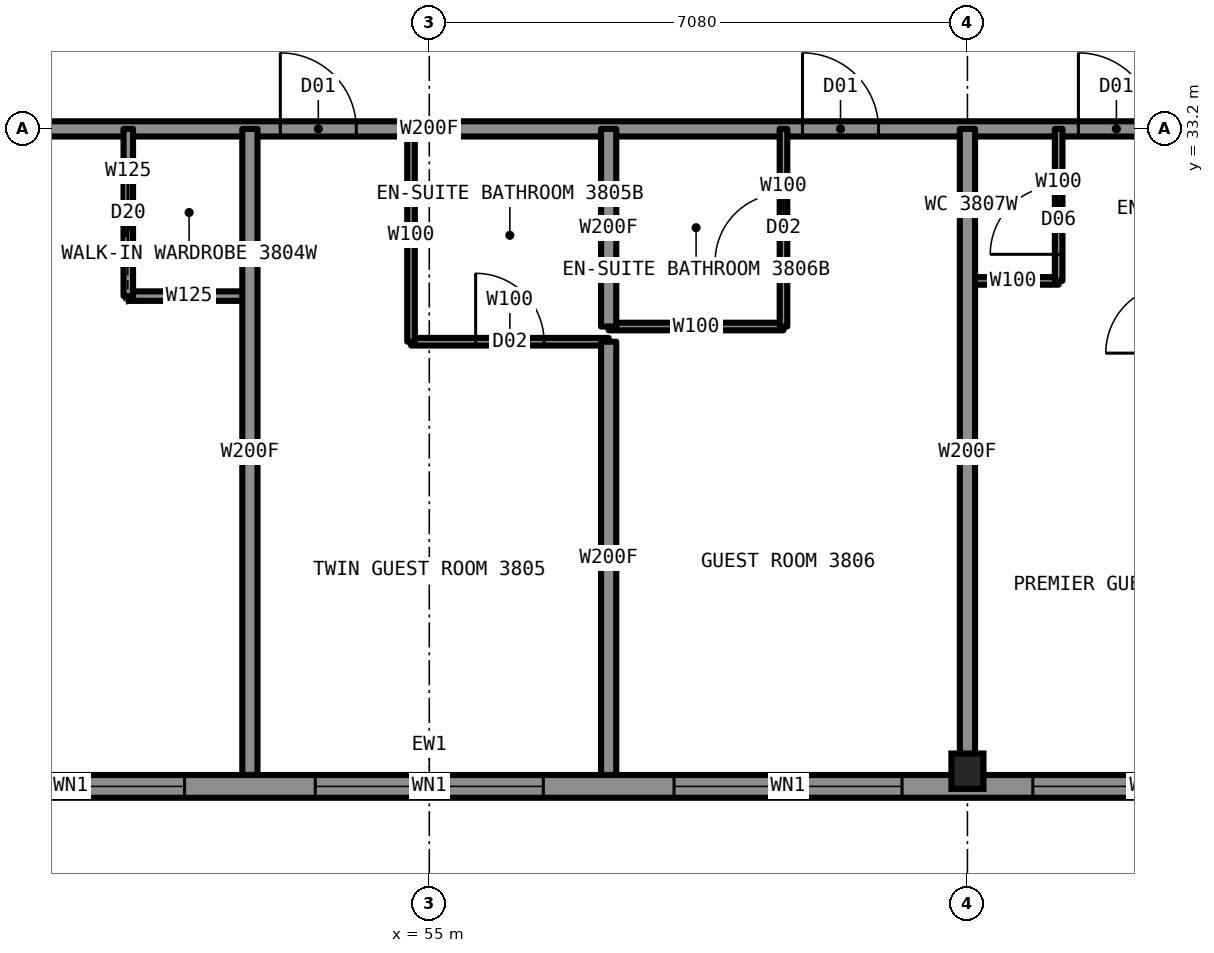
"""IFC4 building model, lengths in metres.
Left out: names, types, materials, properties, quantities, classifications, styles, units other than length and angle.
Written with IfcOpenShell. Run it as: python <this file> out.ifc"""

import sys

from ifc_helpers import new_model, si_unit, direction, frame, frame_2d, origin, origin_2d, place, context, subcontext, project, spatial, rectangle, i_section, extrude, element, fill, save


model = new_model("IFC4")
c1 = context("Model", 3, precision=1e-05, world=origin(), true_north=direction((0.0, 1.0)))
c2 = subcontext(c1, "Body", "Model", "MODEL_VIEW")
j1 = project(units=[si_unit("LENGTHUNIT", "METRE"), si_unit("PLANEANGLEUNIT", "RADIAN")], contexts=[c1])
p1 = place(None, origin())
s1 = spatial("IfcSite", under=j1, at=p1, CompositionType="ELEMENT")
p2 = place(p1, origin())
s2 = spatial("IfcBuilding", under=s1, at=p2, CompositionType="ELEMENT")
p3 = place(p2, frame((0.0, 0.0, 135.4)))
s3 = spatial("IfcBuildingStorey", under=s2, at=p3, CompositionType="ELEMENT", Elevation=135.4)
p4 = place(p3, frame((62.08, 24.75, 0.0), z_axis=(0.0, 0.0, 1.0), x_axis=(1.0, 0.0, 0.0)))
e1 = element("IfcColumn", 1, at=p4, inside=s3, PredefinedType="COLUMN", context=c2, shape_type="SweptSolid", body=[
    extrude(i_section(OverallWidth=0.422, OverallDepth=0.465, WebThickness=0.045, FlangeThickness=0.073, at=origin_2d()), origin(), (0.0, 0.0, 1.0), 3.5),
])
p5 = place(p3, frame((43.2, 33.2, 0.0), z_axis=(0.0, 0.0, 1.0), x_axis=(1.0, 0.0, 0.0)))
e2 = element("IfcWall", 2, at=p5, inside=s3, PredefinedType="PARTITIONING", context=c2, shape_type="SweptSolid", body=[
    extrude(rectangle(XDim=23.6, YDim=0.2, at=frame_2d((11.8, 0.0))), origin(), (0.0, 0.0, 1.0), 3.33),
])
p6 = place(p5, frame((3.0, 0.0, 0.0)))
e3 = element("IfcOpeningElement", 3, at=p6, cuts=e2, PredefinedType="OPENING", context=c2, shape_type="SweptSolid", body=[
    extrude(rectangle(XDim=1.0, YDim=2.2, at=frame_2d((0.5, 1.1))), frame((0.0, 0.11, 0.0), z_axis=(0.0, -1.0, 0.0), x_axis=(1.0, 0.0, 0.0)), (0.0, 0.0, 1.0), 0.22),
])
p7 = place(p5, frame((9.84, 0.0, 0.0)))
e4 = element("IfcOpeningElement", 4, at=p7, cuts=e2, PredefinedType="OPENING", context=c2, shape_type="SweptSolid", body=[
    extrude(rectangle(XDim=1.0, YDim=2.2, at=frame_2d((0.5, 1.1))), frame((0.0, 0.11, 0.0), z_axis=(0.0, -1.0, 0.0), x_axis=(1.0, 0.0, 0.0)), (0.0, 0.0, 1.0), 0.22),
])
p8 = place(p5, frame((16.71, 0.0, 0.0)))
e5 = element("IfcOpeningElement", 5, at=p8, cuts=e2, PredefinedType="OPENING", context=c2, shape_type="SweptSolid", body=[
    extrude(rectangle(XDim=1.0, YDim=2.2, at=frame_2d((0.5, 1.1))), frame((0.0, 0.11, 0.0), z_axis=(0.0, -1.0, 0.0), x_axis=(1.0, 0.0, 0.0)), (0.0, 0.0, 1.0), 0.22),
])
p9 = place(p5, frame((20.34, 0.0, 0.0)))
e6 = element("IfcOpeningElement", 6, at=p9, cuts=e2, PredefinedType="OPENING", context=c2, shape_type="SweptSolid", body=[
    extrude(rectangle(XDim=1.0, YDim=2.2, at=frame_2d((0.5, 1.1))), frame((0.0, 0.11, 0.0), z_axis=(0.0, -1.0, 0.0), x_axis=(1.0, 0.0, 0.0)), (0.0, 0.0, 1.0), 0.22),
])
p10 = place(p3, frame((62.08, 31.2, 0.0), z_axis=(0.0, 0.0, 1.0), x_axis=(1.0, 0.0, 0.0)))
e7 = element("IfcWall", 7, at=p10, inside=s3, PredefinedType="PARTITIONING", context=c2, shape_type="SweptSolid", body=[
    extrude(rectangle(XDim=1.2, YDim=0.1, at=frame_2d((0.6, 0.0))), origin(), (0.0, 0.0, 1.0), 3.33),
])
p11 = place(p3, frame((51.04, 31.0, 0.0), z_axis=(0.0, 0.0, 1.0), x_axis=(1.0, 0.0, 0.0)))
e8 = element("IfcWall", 8, at=p11, inside=s3, PredefinedType="PARTITIONING", context=c2, shape_type="SweptSolid", body=[
    extrude(rectangle(XDim=1.6, YDim=0.125, at=frame_2d((0.8, 0.0))), origin(), (0.0, 0.0, 1.0), 3.33),
])
p12 = place(p3, frame((57.36, 30.6, 0.0), z_axis=(0.0, 0.0, 1.0), x_axis=(1.0, 0.0, 0.0)))
e9 = element("IfcWall", 9, at=p12, inside=s3, PredefinedType="PARTITIONING", context=c2, shape_type="SweptSolid", body=[
    extrude(rectangle(XDim=2.3, YDim=0.1, at=frame_2d((1.15, 0.0))), origin(), (0.0, 0.0, 1.0), 3.33),
])
p13 = place(p3, frame((54.76, 30.4, 0.0), z_axis=(0.0, 0.0, 1.0), x_axis=(1.0, 0.0, 0.0)))
e10 = element("IfcWall", 10, at=p13, inside=s3, PredefinedType="PARTITIONING", context=c2, shape_type="SweptSolid", body=[
    extrude(rectangle(XDim=2.6, YDim=0.1, at=frame_2d((1.3, 0.0))), origin(), (0.0, 0.0, 1.0), 3.33),
])
p14 = place(p13, frame((0.85, 0.0, 0.0)))
e11 = element("IfcOpeningElement", 11, at=p14, cuts=e10, PredefinedType="OPENING", context=c2, shape_type="SweptSolid", body=[
    extrude(rectangle(XDim=0.9, YDim=2.1, at=frame_2d((0.45, 1.05))), frame((0.0, 0.06, 0.0), z_axis=(0.0, -1.0, 0.0), x_axis=(1.0, 0.0, 0.0)), (0.0, 0.0, 1.0), 0.12),
])
p15 = place(p3, frame((54.76, 30.4, 0.0), z_axis=(0.0, 0.0, 1.0), x_axis=(0.0, 1.0, 0.0)))
e12 = element("IfcWall", 12, at=p15, inside=s3, PredefinedType="PARTITIONING", context=c2, shape_type="SweptSolid", body=[
    extrude(rectangle(XDim=2.8, YDim=0.1, at=frame_2d((1.4, 0.0))), origin(), (0.0, 0.0, 1.0), 3.33),
])
p16 = place(p3, frame((52.64, 24.7, 0.0), z_axis=(0.0, 0.0, 1.0), x_axis=(0.0, 1.0, 0.0)))
e13 = element("IfcWall", 13, at=p16, inside=s3, PredefinedType="PARTITIONING", context=c2, shape_type="SweptSolid", body=[
    extrude(rectangle(XDim=8.5, YDim=0.2, at=frame_2d((4.25, 0.0))), origin(), (0.0, 0.0, 1.0), 3.33),
])
p17 = place(p3, frame((51.04, 31.0, 0.0), z_axis=(0.0, 0.0, 1.0), x_axis=(0.0, 1.0, 0.0)))
e14 = element("IfcWall", 14, at=p17, inside=s3, PredefinedType="PARTITIONING", context=c2, shape_type="SweptSolid", body=[
    extrude(rectangle(XDim=2.2, YDim=0.125, at=frame_2d((1.1, 0.0))), origin(), (0.0, 0.0, 1.0), 3.33),
])
p18 = place(p17, frame((0.7, 0.0, 0.0)))
e15 = element("IfcOpeningElement", 15, at=p18, cuts=e14, PredefinedType="OPENING", context=c2, shape_type="SweptSolid", body=[
    extrude(rectangle(XDim=0.8, YDim=2.1, at=frame_2d((0.4, 1.05))), frame((0.0, 0.073, 0.0), z_axis=(0.0, -1.0, 0.0), x_axis=(1.0, 0.0, 0.0)), (0.0, 0.0, 1.0), 0.145),
])
p19 = place(p3, frame((57.36, 24.7, 0.0), z_axis=(0.0, 0.0, 1.0), x_axis=(0.0, 1.0, 0.0)))
e16 = element("IfcWall", 16, at=p19, inside=s3, PredefinedType="PARTITIONING", context=c2, shape_type="SweptSolid", body=[
    extrude(rectangle(XDim=5.7, YDim=0.2, at=frame_2d((2.85, 0.0))), origin(), (0.0, 0.0, 1.0), 3.33),
])
p20 = place(p3, frame((57.36, 30.6, 0.0), z_axis=(0.0, 0.0, 1.0), x_axis=(0.0, 1.0, 0.0)))
e17 = element("IfcWall", 17, at=p20, inside=s3, PredefinedType="PARTITIONING", context=c2, shape_type="SweptSolid", body=[
    extrude(rectangle(XDim=2.6, YDim=0.2, at=frame_2d((1.3, 0.0))), origin(), (0.0, 0.0, 1.0), 3.33),
])
p21 = place(p3, frame((59.66, 30.6, 0.0), z_axis=(0.0, 0.0, 1.0), x_axis=(0.0, 1.0, 0.0)))
e18 = element("IfcWall", 18, at=p21, inside=s3, PredefinedType="PARTITIONING", context=c2, shape_type="SweptSolid", body=[
    extrude(rectangle(XDim=2.6, YDim=0.1, at=frame_2d((1.3, 0.0))), origin(), (0.0, 0.0, 1.0), 3.33),
])
p22 = place(p21, frame((0.85, 0.0, 0.0)))
e19 = element("IfcOpeningElement", 19, at=p22, cuts=e18, PredefinedType="OPENING", context=c2, shape_type="SweptSolid", body=[
    extrude(rectangle(XDim=0.9, YDim=2.1, at=frame_2d((0.45, 1.05))), frame((0.0, 0.06, 0.0), z_axis=(0.0, -1.0, 0.0), x_axis=(1.0, 0.0, 0.0)), (0.0, 0.0, 1.0), 0.12),
])
p23 = place(p3, frame((62.08, 24.7, 0.0), z_axis=(0.0, 0.0, 1.0), x_axis=(0.0, 1.0, 0.0)))
e20 = element("IfcWall", 20, at=p23, inside=s3, PredefinedType="PARTITIONING", context=c2, shape_type="SweptSolid", body=[
    extrude(rectangle(XDim=8.5, YDim=0.2, at=frame_2d((4.25, 0.0))), origin(), (0.0, 0.0, 1.0), 2.573),
])
p24 = place(p3, frame((63.28, 31.2, 0.0), z_axis=(0.0, 0.0, 1.0), x_axis=(0.0, 1.0, 0.0)))
e21 = element("IfcWall", 21, at=p24, inside=s3, PredefinedType="PARTITIONING", context=c2, shape_type="SweptSolid", body=[
    extrude(rectangle(XDim=2.0, YDim=0.1, at=frame_2d((1.0, 0.0))), origin(), (0.0, 0.0, 1.0), 3.33),
])
p25 = place(p24, frame((0.35, 0.0, 0.0)))
e22 = element("IfcOpeningElement", 22, at=p25, cuts=e21, PredefinedType="OPENING", context=c2, shape_type="SweptSolid", body=[
    extrude(rectangle(XDim=0.9, YDim=2.1, at=frame_2d((0.45, 1.05))), frame((0.0, 0.06, 0.0), z_axis=(0.0, -1.0, 0.0), x_axis=(1.0, 0.0, 0.0)), (0.0, 0.0, 1.0), 0.12),
])
p26 = place(p3, frame((39.9, 24.55, 0.0), z_axis=(0.0, 0.0, 1.0), x_axis=(1.0, 0.0, 0.0)))
e23 = element("IfcWall", 23, at=p26, inside=s3, PredefinedType="SOLIDWALL", context=c2, shape_type="SweptSolid", body=[
    extrude(rectangle(XDim=30.2, YDim=0.3, at=frame_2d((15.1, 0.0))), origin(), (0.0, 0.0, 1.0), 2.83),
])
p27 = place(p26, frame((0.85, 0.0, 0.5)))
e24 = element("IfcOpeningElement", 24, at=p27, cuts=e23, PredefinedType="OPENING", context=c2, shape_type="SweptSolid", body=[
    extrude(rectangle(XDim=1.6, YDim=2.0, at=frame_2d((0.8, 1.0))), frame((0.0, 0.16, 0.0), z_axis=(0.0, -1.0, 0.0), x_axis=(1.0, 0.0, 0.0)), (0.0, 0.0, 1.0), 0.32),
])
p28 = place(p26, frame((4.16, 0.0, 0.5)))
e25 = element("IfcOpeningElement", 25, at=p28, cuts=e23, PredefinedType="OPENING", context=c2, shape_type="SweptSolid", body=[
    extrude(rectangle(XDim=1.3, YDim=1.9, at=frame_2d((0.65, 0.95))), frame((0.0, 0.16, 0.0), z_axis=(0.0, -1.0, 0.0), x_axis=(1.0, 0.0, 0.0)), (0.0, 0.0, 1.0), 0.32),
])
p29 = place(p26, frame((8.88, 0.0, 0.5)))
e26 = element("IfcOpeningElement", 26, at=p29, cuts=e23, PredefinedType="OPENING", context=c2, shape_type="SweptSolid", body=[
    extrude(rectangle(XDim=3.0, YDim=2.0, at=frame_2d((1.5, 1.0))), frame((0.0, 0.16, 0.0), z_axis=(0.0, -1.0, 0.0), x_axis=(1.0, 0.0, 0.0)), (0.0, 0.0, 1.0), 0.32),
])
p30 = place(p26, frame((13.6, 0.0, 0.5)))
e27 = element("IfcOpeningElement", 27, at=p30, cuts=e23, PredefinedType="OPENING", context=c2, shape_type="SweptSolid", body=[
    extrude(rectangle(XDim=3.0, YDim=2.0, at=frame_2d((1.5, 1.0))), frame((0.0, 0.16, 0.0), z_axis=(0.0, -1.0, 0.0), x_axis=(1.0, 0.0, 0.0)), (0.0, 0.0, 1.0), 0.32),
])
p31 = place(p26, frame((18.32, 0.0, 0.5)))
e28 = element("IfcOpeningElement", 28, at=p31, cuts=e23, PredefinedType="OPENING", context=c2, shape_type="SweptSolid", body=[
    extrude(rectangle(XDim=3.0, YDim=2.0, at=frame_2d((1.5, 1.0))), frame((0.0, 0.16, 0.0), z_axis=(0.0, -1.0, 0.0), x_axis=(1.0, 0.0, 0.0)), (0.0, 0.0, 1.0), 0.32),
])
p32 = place(p26, frame((24.69, 0.0, 0.5)))
e29 = element("IfcOpeningElement", 29, at=p32, cuts=e23, PredefinedType="OPENING", context=c2, shape_type="SweptSolid", body=[
    extrude(rectangle(XDim=1.3, YDim=1.9, at=frame_2d((0.65, 0.95))), frame((0.0, 0.16, 0.0), z_axis=(0.0, -1.0, 0.0), x_axis=(1.0, 0.0, 0.0)), (0.0, 0.0, 1.0), 0.32),
])
p33 = place(p26, frame((27.75, 0.0, 0.5)))
e30 = element("IfcOpeningElement", 30, at=p33, cuts=e23, PredefinedType="OPENING", context=c2, shape_type="SweptSolid", body=[
    extrude(rectangle(XDim=1.6, YDim=2.0, at=frame_2d((0.8, 1.0))), frame((0.0, 0.16, 0.0), z_axis=(0.0, -1.0, 0.0), x_axis=(1.0, 0.0, 0.0)), (0.0, 0.0, 1.0), 0.32),
])
p34 = place(p26, frame((5.51, 0.0, 0.5)))
e31 = element("IfcOpeningElement", 31, at=p34, cuts=e23, PredefinedType="OPENING", context=c2, shape_type="SweptSolid", body=[
    extrude(rectangle(XDim=0.7, YDim=0.9, at=frame_2d((0.35, 0.45))), frame((0.0, 0.16, 0.0), z_axis=(0.0, -1.0, 0.0), x_axis=(1.0, 0.0, 0.0)), (0.0, 0.0, 1.0), 0.32),
])
p35 = place(p26, frame((23.99, 0.0, 0.5)))
e32 = element("IfcOpeningElement", 32, at=p35, cuts=e23, PredefinedType="OPENING", context=c2, shape_type="SweptSolid", body=[
    extrude(rectangle(XDim=0.7, YDim=0.9, at=frame_2d((0.35, 0.45))), frame((0.0, 0.16, 0.0), z_axis=(0.0, -1.0, 0.0), x_axis=(1.0, 0.0, 0.0)), (0.0, 0.0, 1.0), 0.32),
])
p36 = place(p18, origin())
e33 = element("IfcDoor", 33, at=p36, inside=s3, OperationType="SLIDING_TO_LEFT", PredefinedType="DOOR", context=c2, shape_type="SweptSolid", body=[
    extrude(rectangle(XDim=0.8, YDim=2.1, at=frame_2d((0.4, 1.05))), frame((0.0, 0.025, 0.0), z_axis=(0.0, -1.0, 0.0), x_axis=(1.0, 0.0, 0.0)), (0.0, 0.0, 1.0), 0.05),
])
fill(e15, e33)
p37 = place(p7, origin())
e34 = element("IfcDoor", 34, at=p37, inside=s3, OperationType="SINGLE_SWING_LEFT", PredefinedType="DOOR", context=c2, shape_type="SweptSolid", body=[
    extrude(rectangle(XDim=1.0, YDim=2.2, at=frame_2d((0.5, 1.1))), frame((0.0, 0.025, 0.0), z_axis=(0.0, -1.0, 0.0), x_axis=(1.0, 0.0, 0.0)), (0.0, 0.0, 1.0), 0.05),
])
fill(e4, e34)
p38 = place(p14, origin())
e35 = element("IfcDoor", 35, at=p38, inside=s3, OperationType="SINGLE_SWING_RIGHT", PredefinedType="DOOR", context=c2, shape_type="SweptSolid", body=[
    extrude(rectangle(XDim=0.9, YDim=2.1, at=frame_2d((0.45, 1.05))), frame((0.0, 0.025, 0.0), z_axis=(0.0, -1.0, 0.0), x_axis=(1.0, 0.0, 0.0)), (0.0, 0.0, 1.0), 0.05),
])
fill(e11, e35)
p39 = place(p8, origin())
e36 = element("IfcDoor", 36, at=p39, inside=s3, OperationType="SINGLE_SWING_LEFT", PredefinedType="DOOR", context=c2, shape_type="SweptSolid", body=[
    extrude(rectangle(XDim=1.0, YDim=2.2, at=frame_2d((0.5, 1.1))), frame((0.0, 0.025, 0.0), z_axis=(0.0, -1.0, 0.0), x_axis=(1.0, 0.0, 0.0)), (0.0, 0.0, 1.0), 0.05),
])
fill(e5, e36)
p40 = place(p22, origin())
e37 = element("IfcDoor", 37, at=p40, inside=s3, OperationType="SINGLE_SWING_RIGHT", PredefinedType="DOOR", context=c2, shape_type="SweptSolid", body=[
    extrude(rectangle(XDim=0.9, YDim=2.1, at=frame_2d((0.45, 1.05))), frame((0.0, 0.025, 0.0), z_axis=(0.0, -1.0, 0.0), x_axis=(1.0, 0.0, 0.0)), (0.0, 0.0, 1.0), 0.05),
])
fill(e19, e37)
p41 = place(p9, origin())
e38 = element("IfcDoor", 38, at=p41, inside=s3, OperationType="SINGLE_SWING_LEFT", PredefinedType="DOOR", context=c2, shape_type="SweptSolid", body=[
    extrude(rectangle(XDim=1.0, YDim=2.2, at=frame_2d((0.5, 1.1))), frame((0.0, 0.025, 0.0), z_axis=(0.0, -1.0, 0.0), x_axis=(1.0, 0.0, 0.0)), (0.0, 0.0, 1.0), 0.05),
])
fill(e6, e38)
p42 = place(p25, origin())
e39 = element("IfcDoor", 39, at=p42, inside=s3, OperationType="SINGLE_SWING_LEFT", PredefinedType="DOOR", context=c2, shape_type="SweptSolid", body=[
    extrude(rectangle(XDim=0.9, YDim=2.1, at=frame_2d((0.45, 1.05))), frame((0.0, 0.025, 0.0), z_axis=(0.0, -1.0, 0.0), x_axis=(1.0, 0.0, 0.0)), (0.0, 0.0, 1.0), 0.05),
])
fill(e22, e39)
p43 = place(p29, origin())
e40 = element("IfcWindow", 40, at=p43, inside=s3, PartitioningType="SINGLE_PANEL", PredefinedType="WINDOW", context=c2, shape_type="SweptSolid", body=[
    extrude(rectangle(XDim=3.0, YDim=2.0, at=frame_2d((1.5, 1.0))), frame((0.0, 0.03, 0.0), z_axis=(0.0, -1.0, 0.0), x_axis=(1.0, 0.0, 0.0)), (0.0, 0.0, 1.0), 0.06),
])
fill(e26, e40)
p44 = place(p30, origin())
e41 = element("IfcWindow", 41, at=p44, inside=s3, PartitioningType="SINGLE_PANEL", PredefinedType="WINDOW", context=c2, shape_type="SweptSolid", body=[
    extrude(rectangle(XDim=3.0, YDim=2.0, at=frame_2d((1.5, 1.0))), frame((0.0, 0.03, 0.0), z_axis=(0.0, -1.0, 0.0), x_axis=(1.0, 0.0, 0.0)), (0.0, 0.0, 1.0), 0.06),
])
fill(e27, e41)
p45 = place(p31, origin())
e42 = element("IfcWindow", 42, at=p45, inside=s3, PartitioningType="SINGLE_PANEL", PredefinedType="WINDOW", context=c2, shape_type="SweptSolid", body=[
    extrude(rectangle(XDim=3.0, YDim=2.0, at=frame_2d((1.5, 1.0))), frame((0.0, 0.03, 0.0), z_axis=(0.0, -1.0, 0.0), x_axis=(1.0, 0.0, 0.0)), (0.0, 0.0, 1.0), 0.06),
])
fill(e28, e42)
p46 = place(p35, origin())
e43 = element("IfcWindow", 43, at=p46, inside=s3, PartitioningType="SINGLE_PANEL", PredefinedType="WINDOW", context=c2, shape_type="SweptSolid", body=[
    extrude(rectangle(XDim=0.7, YDim=0.9, at=frame_2d((0.35, 0.45))), frame((0.0, 0.03, 0.0), z_axis=(0.0, -1.0, 0.0), x_axis=(1.0, 0.0, 0.0)), (0.0, 0.0, 1.0), 0.06),
])
fill(e32, e43)
save(model, sys.argv[1])
